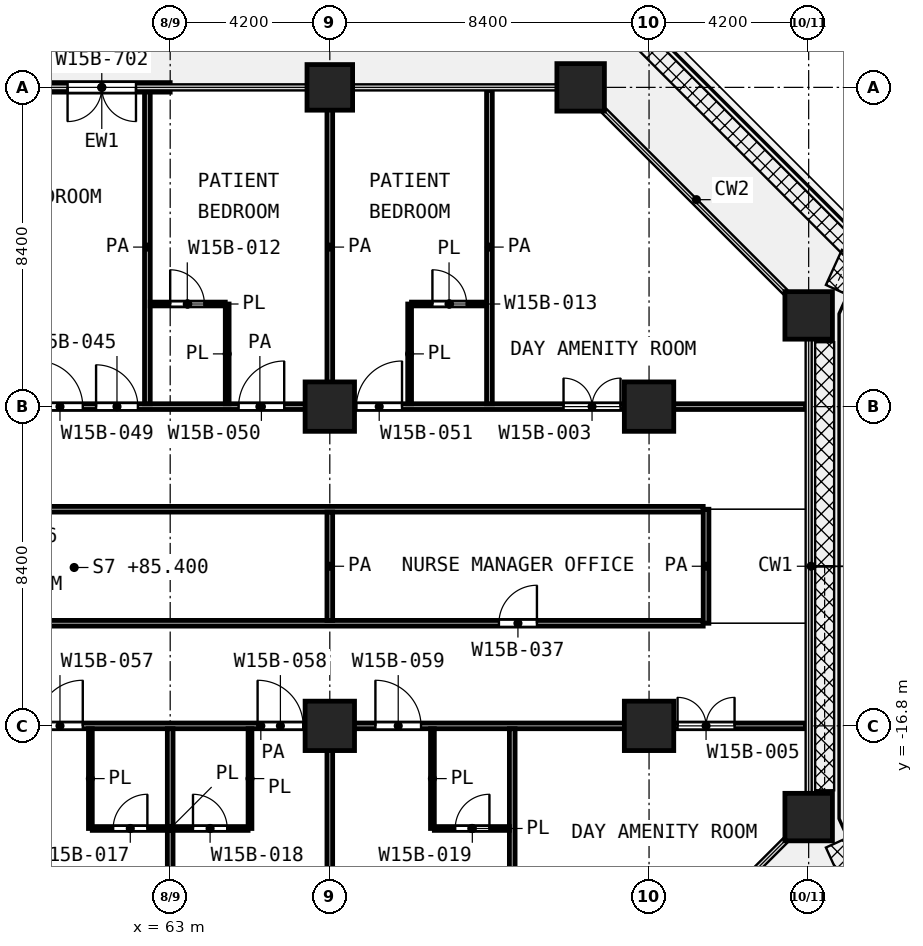
"""IFC4 building model, lengths in metres.
Left out: names, types, materials, properties, quantities, classifications, styles, units other than length and angle.
Written with IfcOpenShell. Run it as: python <this file> out.ifc"""

import sys

from ifc_helpers import new_model, si_unit, direction, frame, frame_2d, origin, origin_2d, place, context, subcontext, project, spatial, rectangle, extrude, element, fill, save


model = new_model("IFC4")
c1 = context("Model", 3, precision=1e-05, world=origin(), true_north=direction((0.0, 1.0)))
c2 = subcontext(c1, "Body", "Model", "MODEL_VIEW")
j1 = project(units=[si_unit("LENGTHUNIT", "METRE"), si_unit("PLANEANGLEUNIT", "RADIAN")], contexts=[c1])
p1 = place(None, origin())
s1 = spatial("IfcSite", under=j1, at=p1, CompositionType="ELEMENT")
p2 = place(p1, origin())
s2 = spatial("IfcBuilding", under=s1, at=p2, CompositionType="ELEMENT")
p3 = place(p2, frame((0.0, 0.0, 85.4)))
s3 = spatial("IfcBuildingStorey", under=s2, at=p3, CompositionType="ELEMENT", Elevation=85.4)
p4 = place(p3, frame((67.2, 0.0, 0.0), z_axis=(0.0, 0.0, 1.0), x_axis=(1.0, 0.0, 0.0)))
e1 = element("IfcColumn", 1, at=p4, inside=s3, PredefinedType="COLUMN", context=c2, shape_type="SweptSolid", body=[
    extrude(rectangle(XDim=1.2, YDim=1.2, at=origin_2d()), origin(), (0.0, 0.0, 1.0), 4.2),
])
for number, where, z_axis, x_axis in (
    (2, (73.8, 0.0, 0.0), (0.0, 0.0, 1.0), (1.0, 0.0, 0.0)),
    (3, (79.8, -6.0, 0.0), (0.0, 0.0, 1.0), (1.0, 0.0, 0.0)),
):
    element("IfcColumn", number, at=place(p3, frame(where, z_axis=z_axis, x_axis=x_axis)), inside=s3, PredefinedType="COLUMN", context=c2, shape_type="SweptSolid", body=[
        extrude(rectangle(XDim=1.25, YDim=1.25, at=origin_2d()), origin(), (0.0, 0.0, 1.0), 4.2),
    ])
for number, where, z_axis, x_axis in (
    (4, (67.2, -8.4, 0.0), (0.0, 0.0, 1.0), (1.0, 0.0, 0.0)),
    (5, (75.6, -8.4, 0.0), (0.0, 0.0, 1.0), (1.0, 0.0, 0.0)),
    (6, (67.2, -16.8, 0.0), (0.0, 0.0, 1.0), (1.0, 0.0, 0.0)),
    (7, (75.6, -16.8, 0.0), (0.0, 0.0, 1.0), (1.0, 0.0, 0.0)),
):
    element("IfcColumn", number, at=place(p3, frame(where, z_axis=z_axis, x_axis=x_axis)), inside=s3, PredefinedType="COLUMN", context=c2, shape_type="SweptSolid", body=[
        extrude(rectangle(XDim=1.3, YDim=1.3, at=origin_2d()), origin(), (0.0, 0.0, 1.0), 4.2),
    ])
p5 = place(p3, frame((79.8, -19.2, 0.0), z_axis=(0.0, 0.0, 1.0), x_axis=(1.0, 0.0, 0.0)))
e8 = element("IfcColumn", 8, at=p5, inside=s3, PredefinedType="COLUMN", context=c2, shape_type="SweptSolid", body=[
    extrude(rectangle(XDim=1.25, YDim=1.25, at=origin_2d()), origin(), (0.0, 0.0, 1.0), 4.2),
])
p6 = place(p3, frame((63.0, 0.0, 0.0), z_axis=(0.0, 0.0, 1.0), x_axis=(-1.0, 0.0, 0.0)))
e9 = element("IfcWall", 9, at=p6, inside=s3, PredefinedType="SOLIDWALL", context=c2, shape_type="SweptSolid", body=[
    extrude(rectangle(XDim=3.6, YDim=0.25, at=frame_2d((1.8, 0.0))), origin(), (0.0, 0.0, 1.0), 3.78),
])
p7 = place(p6, frame((0.9, 0.0, 0.0)))
e10 = element("IfcOpeningElement", 10, at=p7, cuts=e9, PredefinedType="OPENING", context=c2, shape_type="SweptSolid", body=[
    extrude(rectangle(XDim=1.8, YDim=2.1, at=frame_2d((0.9, 1.05))), frame((0.0, 0.135, 0.0), z_axis=(0.0, -1.0, 0.0), x_axis=(1.0, 0.0, 0.0)), (0.0, 0.0, 1.0), 0.27),
])
p8 = place(p3, frame((60.95, -19.5, 0.0), z_axis=(0.0, 0.0, 1.0), x_axis=(1.0, 0.0, 0.0)))
e11 = element("IfcWall", 11, at=p8, inside=s3, PredefinedType="PARTITIONING", context=c2, shape_type="SweptSolid", body=[
    extrude(rectangle(XDim=4.1, YDim=0.1, at=frame_2d((2.05, 0.0))), origin(), (0.0, 0.0, 1.0), 3.9),
])
p9 = place(p8, frame((0.55, 0.0, 0.0)))
e12 = element("IfcOpeningElement", 12, at=p9, cuts=e11, PredefinedType="OPENING", context=c2, shape_type="SweptSolid", body=[
    extrude(rectangle(XDim=0.9, YDim=2.1, at=frame_2d((0.45, 1.05))), frame((0.0, 0.06, 0.0), z_axis=(0.0, -1.0, 0.0), x_axis=(1.0, 0.0, 0.0)), (0.0, 0.0, 1.0), 0.12),
])
p10 = place(p8, frame((2.65, 0.0, 0.0)))
e13 = element("IfcOpeningElement", 13, at=p10, cuts=e11, PredefinedType="OPENING", context=c2, shape_type="SweptSolid", body=[
    extrude(rectangle(XDim=0.9, YDim=2.1, at=frame_2d((0.45, 1.05))), frame((0.0, 0.06, 0.0), z_axis=(0.0, -1.0, 0.0), x_axis=(1.0, 0.0, 0.0)), (0.0, 0.0, 1.0), 0.12),
])
p11 = place(p3, frame((69.95, -19.5, 0.0), z_axis=(0.0, 0.0, 1.0), x_axis=(1.0, 0.0, 0.0)))
e14 = element("IfcWall", 14, at=p11, inside=s3, PredefinedType="PARTITIONING", context=c2, shape_type="SweptSolid", body=[
    extrude(rectangle(XDim=1.975, YDim=0.1, at=frame_2d((0.988, 0.0))), origin(), (0.0, 0.0, 1.0), 3.9),
])
p12 = place(p11, frame((0.55, 0.0, 0.0)))
e15 = element("IfcOpeningElement", 15, at=p12, cuts=e14, PredefinedType="OPENING", context=c2, shape_type="SweptSolid", body=[
    extrude(rectangle(XDim=0.9, YDim=2.1, at=frame_2d((0.45, 1.05))), frame((0.0, 0.06, 0.0), z_axis=(0.0, -1.0, 0.0), x_axis=(1.0, 0.0, 0.0)), (0.0, 0.0, 1.0), 0.12),
])
p13 = place(p3, frame((62.475, -5.7, 0.0), z_axis=(0.0, 0.0, 1.0), x_axis=(1.0, 0.0, 0.0)))
e16 = element("IfcWall", 16, at=p13, inside=s3, PredefinedType="PARTITIONING", context=c2, shape_type="SweptSolid", body=[
    extrude(rectangle(XDim=1.975, YDim=0.1, at=frame_2d((0.987, 0.0))), origin(), (0.0, 0.0, 1.0), 3.9),
])
p14 = place(p13, frame((0.525, 0.0, 0.0)))
e17 = element("IfcOpeningElement", 17, at=p14, cuts=e16, PredefinedType="OPENING", context=c2, shape_type="SweptSolid", body=[
    extrude(rectangle(XDim=0.9, YDim=2.1, at=frame_2d((0.45, 1.05))), frame((0.0, 0.06, 0.0), z_axis=(0.0, -1.0, 0.0), x_axis=(1.0, 0.0, 0.0)), (0.0, 0.0, 1.0), 0.12),
])
p15 = place(p3, frame((69.35, -5.7, 0.0), z_axis=(0.0, 0.0, 1.0), x_axis=(1.0, 0.0, 0.0)))
e18 = element("IfcWall", 18, at=p15, inside=s3, PredefinedType="PARTITIONING", context=c2, shape_type="SweptSolid", body=[
    extrude(rectangle(XDim=1.975, YDim=0.1, at=frame_2d((0.987, 0.0))), origin(), (0.0, 0.0, 1.0), 3.9),
])
p16 = place(p15, frame((0.55, 0.0, 0.0)))
e19 = element("IfcOpeningElement", 19, at=p16, cuts=e18, PredefinedType="OPENING", context=c2, shape_type="SweptSolid", body=[
    extrude(rectangle(XDim=0.9, YDim=2.1, at=frame_2d((0.45, 1.05))), frame((0.0, 0.06, 0.0), z_axis=(0.0, -1.0, 0.0), x_axis=(1.0, 0.0, 0.0)), (0.0, 0.0, 1.0), 0.12),
])
for number, where, z_axis, x_axis in (
    (20, (60.9, -19.5, 0.0), (0.0, 0.0, 1.0), (0.0, 1.0, 0.0)),
    (21, (64.5, -8.325, 0.0), (0.0, 0.0, 1.0), (0.0, 1.0, 0.0)),
    (22, (65.1, -19.5, 0.0), (0.0, 0.0, 1.0), (0.0, 1.0, 0.0)),
    (23, (69.3, -8.325, 0.0), (0.0, 0.0, 1.0), (0.0, 1.0, 0.0)),
    (24, (69.9, -19.5, 0.0), (0.0, 0.0, 1.0), (0.0, 1.0, 0.0)),
):
    element("IfcWall", number, at=place(p3, frame(where, z_axis=z_axis, x_axis=x_axis)), inside=s3, PredefinedType="PARTITIONING", context=c2, shape_type="SweptSolid", body=[
        extrude(rectangle(XDim=2.625, YDim=0.1, at=frame_2d((1.312, 0.0))), origin(), (0.0, 0.0, 1.0), 3.9),
    ])
p17 = place(p3, frame((51.05, -16.8, 0.0), z_axis=(0.0, 0.0, 1.0), x_axis=(1.0, 0.0, 0.0)))
e25 = element("IfcWall", 25, at=p17, inside=s3, PredefinedType="PARTITIONING", context=c2, shape_type="SweptSolid", body=[
    extrude(rectangle(XDim=28.67, YDim=0.15, at=frame_2d((14.335, 0.0))), origin(), (0.0, 0.0, 1.0), 3.9),
])
p18 = place(p17, frame((0.975, 0.0, 0.0)))
e26 = element("IfcOpeningElement", 26, at=p18, cuts=e25, PredefinedType="OPENING", context=c2, shape_type="SweptSolid", body=[
    extrude(rectangle(XDim=1.0, YDim=2.1, at=frame_2d((0.5, 1.05))), frame((0.0, 0.085, 0.0), z_axis=(0.0, -1.0, 0.0), x_axis=(1.0, 0.0, 0.0)), (0.0, 0.0, 1.0), 0.17),
])
p19 = place(p17, frame((5.85, 0.0, 0.0)))
e27 = element("IfcOpeningElement", 27, at=p19, cuts=e25, PredefinedType="OPENING", context=c2, shape_type="SweptSolid", body=[
    extrude(rectangle(XDim=1.2, YDim=2.1, at=frame_2d((0.6, 1.05))), frame((0.0, 0.085, 0.0), z_axis=(0.0, -1.0, 0.0), x_axis=(1.0, 0.0, 0.0)), (0.0, 0.0, 1.0), 0.17),
])
p20 = place(p17, frame((8.45, 0.0, 0.0)))
e28 = element("IfcOpeningElement", 28, at=p20, cuts=e25, PredefinedType="OPENING", context=c2, shape_type="SweptSolid", body=[
    extrude(rectangle(XDim=1.2, YDim=2.1, at=frame_2d((0.6, 1.05))), frame((0.0, 0.085, 0.0), z_axis=(0.0, -1.0, 0.0), x_axis=(1.0, 0.0, 0.0)), (0.0, 0.0, 1.0), 0.17),
])
p21 = place(p17, frame((14.25, 0.0, 0.0)))
e29 = element("IfcOpeningElement", 29, at=p21, cuts=e25, PredefinedType="OPENING", context=c2, shape_type="SweptSolid", body=[
    extrude(rectangle(XDim=1.2, YDim=2.1, at=frame_2d((0.6, 1.05))), frame((0.0, 0.085, 0.0), z_axis=(0.0, -1.0, 0.0), x_axis=(1.0, 0.0, 0.0)), (0.0, 0.0, 1.0), 0.17),
])
p22 = place(p17, frame((17.35, 0.0, 0.0)))
e30 = element("IfcOpeningElement", 30, at=p22, cuts=e25, PredefinedType="OPENING", context=c2, shape_type="SweptSolid", body=[
    extrude(rectangle(XDim=1.2, YDim=2.1, at=frame_2d((0.6, 1.05))), frame((0.0, 0.085, 0.0), z_axis=(0.0, -1.0, 0.0), x_axis=(1.0, 0.0, 0.0)), (0.0, 0.0, 1.0), 0.17),
])
p23 = place(p17, frame((25.3, 0.0, 0.0)))
e31 = element("IfcOpeningElement", 31, at=p23, cuts=e25, PredefinedType="OPENING", context=c2, shape_type="SweptSolid", body=[
    extrude(rectangle(XDim=1.5, YDim=2.1, at=frame_2d((0.75, 1.05))), frame((0.0, 0.085, 0.0), z_axis=(0.0, -1.0, 0.0), x_axis=(1.0, 0.0, 0.0)), (0.0, 0.0, 1.0), 0.17),
])
p24 = place(p3, frame((29.475, -14.1, 0.0), z_axis=(0.0, 0.0, 1.0), x_axis=(1.0, 0.0, 0.0)))
e32 = element("IfcWall", 32, at=p24, inside=s3, PredefinedType="PARTITIONING", context=c2, shape_type="SweptSolid", body=[
    extrude(rectangle(XDim=47.55, YDim=0.15, at=frame_2d((23.775, 0.0))), origin(), (0.0, 0.0, 1.0), 3.9),
])
p25 = place(p24, frame((18.625, 0.0, 0.0)))
e33 = element("IfcOpeningElement", 33, at=p25, cuts=e32, PredefinedType="OPENING", context=c2, shape_type="SweptSolid", body=[
    extrude(rectangle(XDim=1.0, YDim=2.1, at=frame_2d((0.5, 1.05))), frame((0.0, 0.085, 0.0), z_axis=(0.0, -1.0, 0.0), x_axis=(1.0, 0.0, 0.0)), (0.0, 0.0, 1.0), 0.17),
])
p26 = place(p24, frame((42.175, 0.0, 0.0)))
e34 = element("IfcOpeningElement", 34, at=p26, cuts=e32, PredefinedType="OPENING", context=c2, shape_type="SweptSolid", body=[
    extrude(rectangle(XDim=1.0, YDim=2.1, at=frame_2d((0.5, 1.05))), frame((0.0, 0.085, 0.0), z_axis=(0.0, -1.0, 0.0), x_axis=(1.0, 0.0, 0.0)), (0.0, 0.0, 1.0), 0.17),
])
p27 = place(p3, frame((29.475, -11.1, 0.0), z_axis=(0.0, 0.0, 1.0), x_axis=(1.0, 0.0, 0.0)))
e35 = element("IfcWall", 35, at=p27, inside=s3, PredefinedType="PARTITIONING", context=c2, shape_type="SweptSolid", body=[
    extrude(rectangle(XDim=47.55, YDim=0.15, at=frame_2d((23.775, 0.0))), origin(), (0.0, 0.0, 1.0), 3.9),
])
p28 = place(p27, frame((3.525, 0.0, 0.0)))
e36 = element("IfcOpeningElement", 36, at=p28, cuts=e35, PredefinedType="OPENING", context=c2, shape_type="SweptSolid", body=[
    extrude(rectangle(XDim=1.2, YDim=2.1, at=frame_2d((0.6, 1.05))), frame((0.0, 0.085, 0.0), z_axis=(0.0, -1.0, 0.0), x_axis=(1.0, 0.0, 0.0)), (0.0, 0.0, 1.0), 0.17),
])
p29 = place(p27, frame((9.925, 0.0, 0.0)))
e37 = element("IfcOpeningElement", 37, at=p29, cuts=e35, PredefinedType="OPENING", context=c2, shape_type="SweptSolid", body=[
    extrude(rectangle(XDim=1.0, YDim=2.1, at=frame_2d((0.5, 1.05))), frame((0.0, 0.085, 0.0), z_axis=(0.0, -1.0, 0.0), x_axis=(1.0, 0.0, 0.0)), (0.0, 0.0, 1.0), 0.17),
])
p30 = place(p27, frame((14.425, 0.0, 0.0)))
e38 = element("IfcOpeningElement", 38, at=p30, cuts=e35, PredefinedType="OPENING", context=c2, shape_type="SweptSolid", body=[
    extrude(rectangle(XDim=1.0, YDim=2.1, at=frame_2d((0.5, 1.05))), frame((0.0, 0.085, 0.0), z_axis=(0.0, -1.0, 0.0), x_axis=(1.0, 0.0, 0.0)), (0.0, 0.0, 1.0), 0.17),
])
p31 = place(p27, frame((28.825, 0.0, 0.0)))
e39 = element("IfcOpeningElement", 39, at=p31, cuts=e35, PredefinedType="OPENING", context=c2, shape_type="SweptSolid", body=[
    extrude(rectangle(XDim=1.0, YDim=2.1, at=frame_2d((0.5, 1.05))), frame((0.0, 0.085, 0.0), z_axis=(0.0, -1.0, 0.0), x_axis=(1.0, 0.0, 0.0)), (0.0, 0.0, 1.0), 0.17),
])
p32 = place(p3, frame((51.0, -8.4, 0.0), z_axis=(0.0, 0.0, 1.0), x_axis=(1.0, 0.0, 0.0)))
e40 = element("IfcWall", 40, at=p32, inside=s3, PredefinedType="PARTITIONING", context=c2, shape_type="SweptSolid", body=[
    extrude(rectangle(XDim=28.72, YDim=0.15, at=frame_2d((14.36, 0.0))), origin(), (0.0, 0.0, 1.0), 3.9),
])
p33 = place(p32, frame((8.5, 0.0, 0.0)))
e41 = element("IfcOpeningElement", 41, at=p33, cuts=e40, PredefinedType="OPENING", context=c2, shape_type="SweptSolid", body=[
    extrude(rectangle(XDim=1.2, YDim=2.1, at=frame_2d((0.6, 1.05))), frame((0.0, 0.085, 0.0), z_axis=(0.0, -1.0, 0.0), x_axis=(1.0, 0.0, 0.0)), (0.0, 0.0, 1.0), 0.17),
])
p34 = place(p32, frame((10.05, 0.0, 0.0)))
e42 = element("IfcOpeningElement", 42, at=p34, cuts=e40, PredefinedType="OPENING", context=c2, shape_type="SweptSolid", body=[
    extrude(rectangle(XDim=1.1, YDim=2.1, at=frame_2d((0.55, 1.05))), frame((0.0, 0.085, 0.0), z_axis=(0.0, -1.0, 0.0), x_axis=(1.0, 0.0, 0.0)), (0.0, 0.0, 1.0), 0.17),
])
p35 = place(p32, frame((13.8, 0.0, 0.0)))
e43 = element("IfcOpeningElement", 43, at=p35, cuts=e40, PredefinedType="OPENING", context=c2, shape_type="SweptSolid", body=[
    extrude(rectangle(XDim=1.2, YDim=2.1, at=frame_2d((0.6, 1.05))), frame((0.0, 0.085, 0.0), z_axis=(0.0, -1.0, 0.0), x_axis=(1.0, 0.0, 0.0)), (0.0, 0.0, 1.0), 0.17),
])
p36 = place(p32, frame((16.9, 0.0, 0.0)))
e44 = element("IfcOpeningElement", 44, at=p36, cuts=e40, PredefinedType="OPENING", context=c2, shape_type="SweptSolid", body=[
    extrude(rectangle(XDim=1.2, YDim=2.1, at=frame_2d((0.6, 1.05))), frame((0.0, 0.085, 0.0), z_axis=(0.0, -1.0, 0.0), x_axis=(1.0, 0.0, 0.0)), (0.0, 0.0, 1.0), 0.17),
])
p37 = place(p32, frame((22.35, 0.0, 0.0)))
e45 = element("IfcOpeningElement", 45, at=p37, cuts=e40, PredefinedType="OPENING", context=c2, shape_type="SweptSolid", body=[
    extrude(rectangle(XDim=1.5, YDim=2.1, at=frame_2d((0.75, 1.05))), frame((0.0, 0.085, 0.0), z_axis=(0.0, -1.0, 0.0), x_axis=(1.0, 0.0, 0.0)), (0.0, 0.0, 1.0), 0.17),
])
p38 = place(p3, frame((62.4, -8.325, 0.0), z_axis=(0.0, 0.0, 1.0), x_axis=(0.0, 1.0, 0.0)))
e46 = element("IfcWall", 46, at=p38, inside=s3, PredefinedType="PARTITIONING", context=c2, shape_type="SweptSolid", body=[
    extrude(rectangle(XDim=8.245, YDim=0.15, at=frame_2d((4.123, 0.0))), origin(), (0.0, 0.0, 1.0), 3.9),
])
for number, where, z_axis, x_axis in (
    (47, (63.0, -25.12, 0.0), (0.0, 0.0, 1.0), (0.0, 1.0, 0.0)),
    (48, (67.2, -25.12, 0.0), (0.0, 0.0, 1.0), (0.0, 1.0, 0.0)),
):
    element("IfcWall", number, at=place(p3, frame(where, z_axis=z_axis, x_axis=x_axis)), inside=s3, PredefinedType="PARTITIONING", context=c2, shape_type="SweptSolid", body=[
        extrude(rectangle(XDim=8.245, YDim=0.15, at=frame_2d((4.123, 0.0))), origin(), (0.0, 0.0, 1.0), 3.9),
    ])
p39 = place(p3, frame((67.2, -14.025, 0.0), z_axis=(0.0, 0.0, 1.0), x_axis=(0.0, 1.0, 0.0)))
e49 = element("IfcWall", 49, at=p39, inside=s3, PredefinedType="PARTITIONING", context=c2, shape_type="SweptSolid", body=[
    extrude(rectangle(XDim=2.85, YDim=0.15, at=frame_2d((1.425, 0.0))), origin(), (0.0, 0.0, 1.0), 3.9),
])
for number, where, z_axis, x_axis in (
    (50, (67.2, -8.325, 0.0), (0.0, 0.0, 1.0), (0.0, 1.0, 0.0)),
    (51, (71.4, -8.325, 0.0), (0.0, 0.0, 1.0), (0.0, 1.0, 0.0)),
):
    element("IfcWall", number, at=place(p3, frame(where, z_axis=z_axis, x_axis=x_axis)), inside=s3, PredefinedType="PARTITIONING", context=c2, shape_type="SweptSolid", body=[
        extrude(rectangle(XDim=8.245, YDim=0.15, at=frame_2d((4.123, 0.0))), origin(), (0.0, 0.0, 1.0), 3.9),
    ])
p40 = place(p3, frame((72.0, -25.12, 0.0), z_axis=(0.0, 0.0, 1.0), x_axis=(0.0, 1.0, 0.0)))
e52 = element("IfcWall", 52, at=p40, inside=s3, PredefinedType="PARTITIONING", context=c2, shape_type="SweptSolid", body=[
    extrude(rectangle(XDim=8.245, YDim=0.15, at=frame_2d((4.123, 0.0))), origin(), (0.0, 0.0, 1.0), 3.9),
])
p41 = place(p3, frame((77.1, -14.1, 0.0), z_axis=(0.0, 0.0, 1.0), x_axis=(0.0, 1.0, 0.0)))
e53 = element("IfcWall", 53, at=p41, inside=s3, PredefinedType="PARTITIONING", context=c2, shape_type="SweptSolid", body=[
    extrude(rectangle(XDim=3.0, YDim=0.15, at=frame_2d((1.5, 0.0))), origin(), (0.0, 0.0, 1.0), 3.9),
])
p42 = place(p7, origin())
e54 = element("IfcDoor", 54, at=p42, inside=s3, OperationType="DOUBLE_DOOR_SINGLE_SWING", PredefinedType="DOOR", context=c2, shape_type="SweptSolid", body=[
    extrude(rectangle(XDim=1.8, YDim=2.1, at=frame_2d((0.9, 1.05))), frame((0.0, 0.025, 0.0), z_axis=(0.0, -1.0, 0.0), x_axis=(1.0, 0.0, 0.0)), (0.0, 0.0, 1.0), 0.05),
])
fill(e10, e54)
p43 = place(p33, origin())
e55 = element("IfcDoor", 55, at=p43, inside=s3, OperationType="SINGLE_SWING_LEFT", PredefinedType="DOOR", context=c2, shape_type="SweptSolid", body=[
    extrude(rectangle(XDim=1.2, YDim=2.1, at=frame_2d((0.6, 1.05))), frame((0.0, 0.025, 0.0), z_axis=(0.0, -1.0, 0.0), x_axis=(1.0, 0.0, 0.0)), (0.0, 0.0, 1.0), 0.05),
])
fill(e41, e55)
p44 = place(p34, origin())
e56 = element("IfcDoor", 56, at=p44, inside=s3, OperationType="SINGLE_SWING_LEFT", PredefinedType="DOOR", context=c2, shape_type="SweptSolid", body=[
    extrude(rectangle(XDim=1.1, YDim=2.1, at=frame_2d((0.55, 1.05))), frame((0.0, 0.025, 0.0), z_axis=(0.0, -1.0, 0.0), x_axis=(1.0, 0.0, 0.0)), (0.0, 0.0, 1.0), 0.05),
])
fill(e42, e56)
p45 = place(p35, origin())
e57 = element("IfcDoor", 57, at=p45, inside=s3, OperationType="SINGLE_SWING_RIGHT", PredefinedType="DOOR", context=c2, shape_type="SweptSolid", body=[
    extrude(rectangle(XDim=1.2, YDim=2.1, at=frame_2d((0.6, 1.05))), frame((0.0, 0.025, 0.0), z_axis=(0.0, -1.0, 0.0), x_axis=(1.0, 0.0, 0.0)), (0.0, 0.0, 1.0), 0.05),
])
fill(e43, e57)
p46 = place(p14, origin())
e58 = element("IfcDoor", 58, at=p46, inside=s3, OperationType="SINGLE_SWING_LEFT", PredefinedType="DOOR", context=c2, shape_type="SweptSolid", body=[
    extrude(rectangle(XDim=0.9, YDim=2.1, at=frame_2d((0.45, 1.05))), frame((0.0, 0.025, 0.0), z_axis=(0.0, -1.0, 0.0), x_axis=(1.0, 0.0, 0.0)), (0.0, 0.0, 1.0), 0.05),
])
fill(e17, e58)
p47 = place(p36, origin())
e59 = element("IfcDoor", 59, at=p47, inside=s3, OperationType="SINGLE_SWING_RIGHT", PredefinedType="DOOR", context=c2, shape_type="SweptSolid", body=[
    extrude(rectangle(XDim=1.2, YDim=2.1, at=frame_2d((0.6, 1.05))), frame((0.0, 0.025, 0.0), z_axis=(0.0, -1.0, 0.0), x_axis=(1.0, 0.0, 0.0)), (0.0, 0.0, 1.0), 0.05),
])
fill(e44, e59)
p48 = place(p16, origin())
e60 = element("IfcDoor", 60, at=p48, inside=s3, OperationType="SINGLE_SWING_LEFT", PredefinedType="DOOR", context=c2, shape_type="SweptSolid", body=[
    extrude(rectangle(XDim=0.9, YDim=2.1, at=frame_2d((0.45, 1.05))), frame((0.0, 0.025, 0.0), z_axis=(0.0, -1.0, 0.0), x_axis=(1.0, 0.0, 0.0)), (0.0, 0.0, 1.0), 0.05),
])
fill(e19, e60)
p49 = place(p37, origin())
e61 = element("IfcDoor", 61, at=p49, inside=s3, OperationType="DOUBLE_DOOR_SINGLE_SWING", PredefinedType="DOOR", context=c2, shape_type="SweptSolid", body=[
    extrude(rectangle(XDim=1.5, YDim=2.1, at=frame_2d((0.75, 1.05))), frame((0.0, 0.025, 0.0), z_axis=(0.0, -1.0, 0.0), x_axis=(1.0, 0.0, 0.0)), (0.0, 0.0, 1.0), 0.05),
])
fill(e45, e61)
p50 = place(p26, origin())
e62 = element("IfcDoor", 62, at=p50, inside=s3, OperationType="SINGLE_SWING_RIGHT", PredefinedType="DOOR", context=c2, shape_type="SweptSolid", body=[
    extrude(rectangle(XDim=1.0, YDim=2.1, at=frame_2d((0.5, 1.05))), frame((0.0, 0.025, 0.0), z_axis=(0.0, -1.0, 0.0), x_axis=(1.0, 0.0, 0.0)), (0.0, 0.0, 1.0), 0.05),
])
fill(e34, e62)
p51 = place(p20, origin())
e63 = element("IfcDoor", 63, at=p51, inside=s3, OperationType="SINGLE_SWING_RIGHT", PredefinedType="DOOR", context=c2, shape_type="SweptSolid", body=[
    extrude(rectangle(XDim=1.2, YDim=2.1, at=frame_2d((0.6, 1.05))), frame((0.0, 0.025, 0.0), z_axis=(0.0, -1.0, 0.0), x_axis=(1.0, 0.0, 0.0)), (0.0, 0.0, 1.0), 0.05),
])
fill(e28, e63)
p52 = place(p9, origin())
e64 = element("IfcDoor", 64, at=p52, inside=s3, OperationType="SINGLE_SWING_RIGHT", PredefinedType="DOOR", context=c2, shape_type="SweptSolid", body=[
    extrude(rectangle(XDim=0.9, YDim=2.1, at=frame_2d((0.45, 1.05))), frame((0.0, 0.025, 0.0), z_axis=(0.0, -1.0, 0.0), x_axis=(1.0, 0.0, 0.0)), (0.0, 0.0, 1.0), 0.05),
])
fill(e12, e64)
p53 = place(p21, origin())
e65 = element("IfcDoor", 65, at=p53, inside=s3, OperationType="SINGLE_SWING_LEFT", PredefinedType="DOOR", context=c2, shape_type="SweptSolid", body=[
    extrude(rectangle(XDim=1.2, YDim=2.1, at=frame_2d((0.6, 1.05))), frame((0.0, 0.025, 0.0), z_axis=(0.0, -1.0, 0.0), x_axis=(1.0, 0.0, 0.0)), (0.0, 0.0, 1.0), 0.05),
])
fill(e29, e65)
p54 = place(p10, origin())
e66 = element("IfcDoor", 66, at=p54, inside=s3, OperationType="SINGLE_SWING_LEFT", PredefinedType="DOOR", context=c2, shape_type="SweptSolid", body=[
    extrude(rectangle(XDim=0.9, YDim=2.1, at=frame_2d((0.45, 1.05))), frame((0.0, 0.025, 0.0), z_axis=(0.0, -1.0, 0.0), x_axis=(1.0, 0.0, 0.0)), (0.0, 0.0, 1.0), 0.05),
])
fill(e13, e66)
p55 = place(p22, origin())
e67 = element("IfcDoor", 67, at=p55, inside=s3, OperationType="SINGLE_SWING_LEFT", PredefinedType="DOOR", context=c2, shape_type="SweptSolid", body=[
    extrude(rectangle(XDim=1.2, YDim=2.1, at=frame_2d((0.6, 1.05))), frame((0.0, 0.025, 0.0), z_axis=(0.0, -1.0, 0.0), x_axis=(1.0, 0.0, 0.0)), (0.0, 0.0, 1.0), 0.05),
])
fill(e30, e67)
p56 = place(p12, origin())
e68 = element("IfcDoor", 68, at=p56, inside=s3, OperationType="SINGLE_SWING_RIGHT", PredefinedType="DOOR", context=c2, shape_type="SweptSolid", body=[
    extrude(rectangle(XDim=0.9, YDim=2.1, at=frame_2d((0.45, 1.05))), frame((0.0, 0.025, 0.0), z_axis=(0.0, -1.0, 0.0), x_axis=(1.0, 0.0, 0.0)), (0.0, 0.0, 1.0), 0.05),
])
fill(e15, e68)
p57 = place(p23, origin())
e69 = element("IfcDoor", 69, at=p57, inside=s3, OperationType="DOUBLE_DOOR_SINGLE_SWING", PredefinedType="DOOR", context=c2, shape_type="SweptSolid", body=[
    extrude(rectangle(XDim=1.5, YDim=2.1, at=frame_2d((0.75, 1.05))), frame((0.0, 0.025, 0.0), z_axis=(0.0, -1.0, 0.0), x_axis=(1.0, 0.0, 0.0)), (0.0, 0.0, 1.0), 0.05),
])
fill(e31, e69)
save(model, sys.argv[1])
